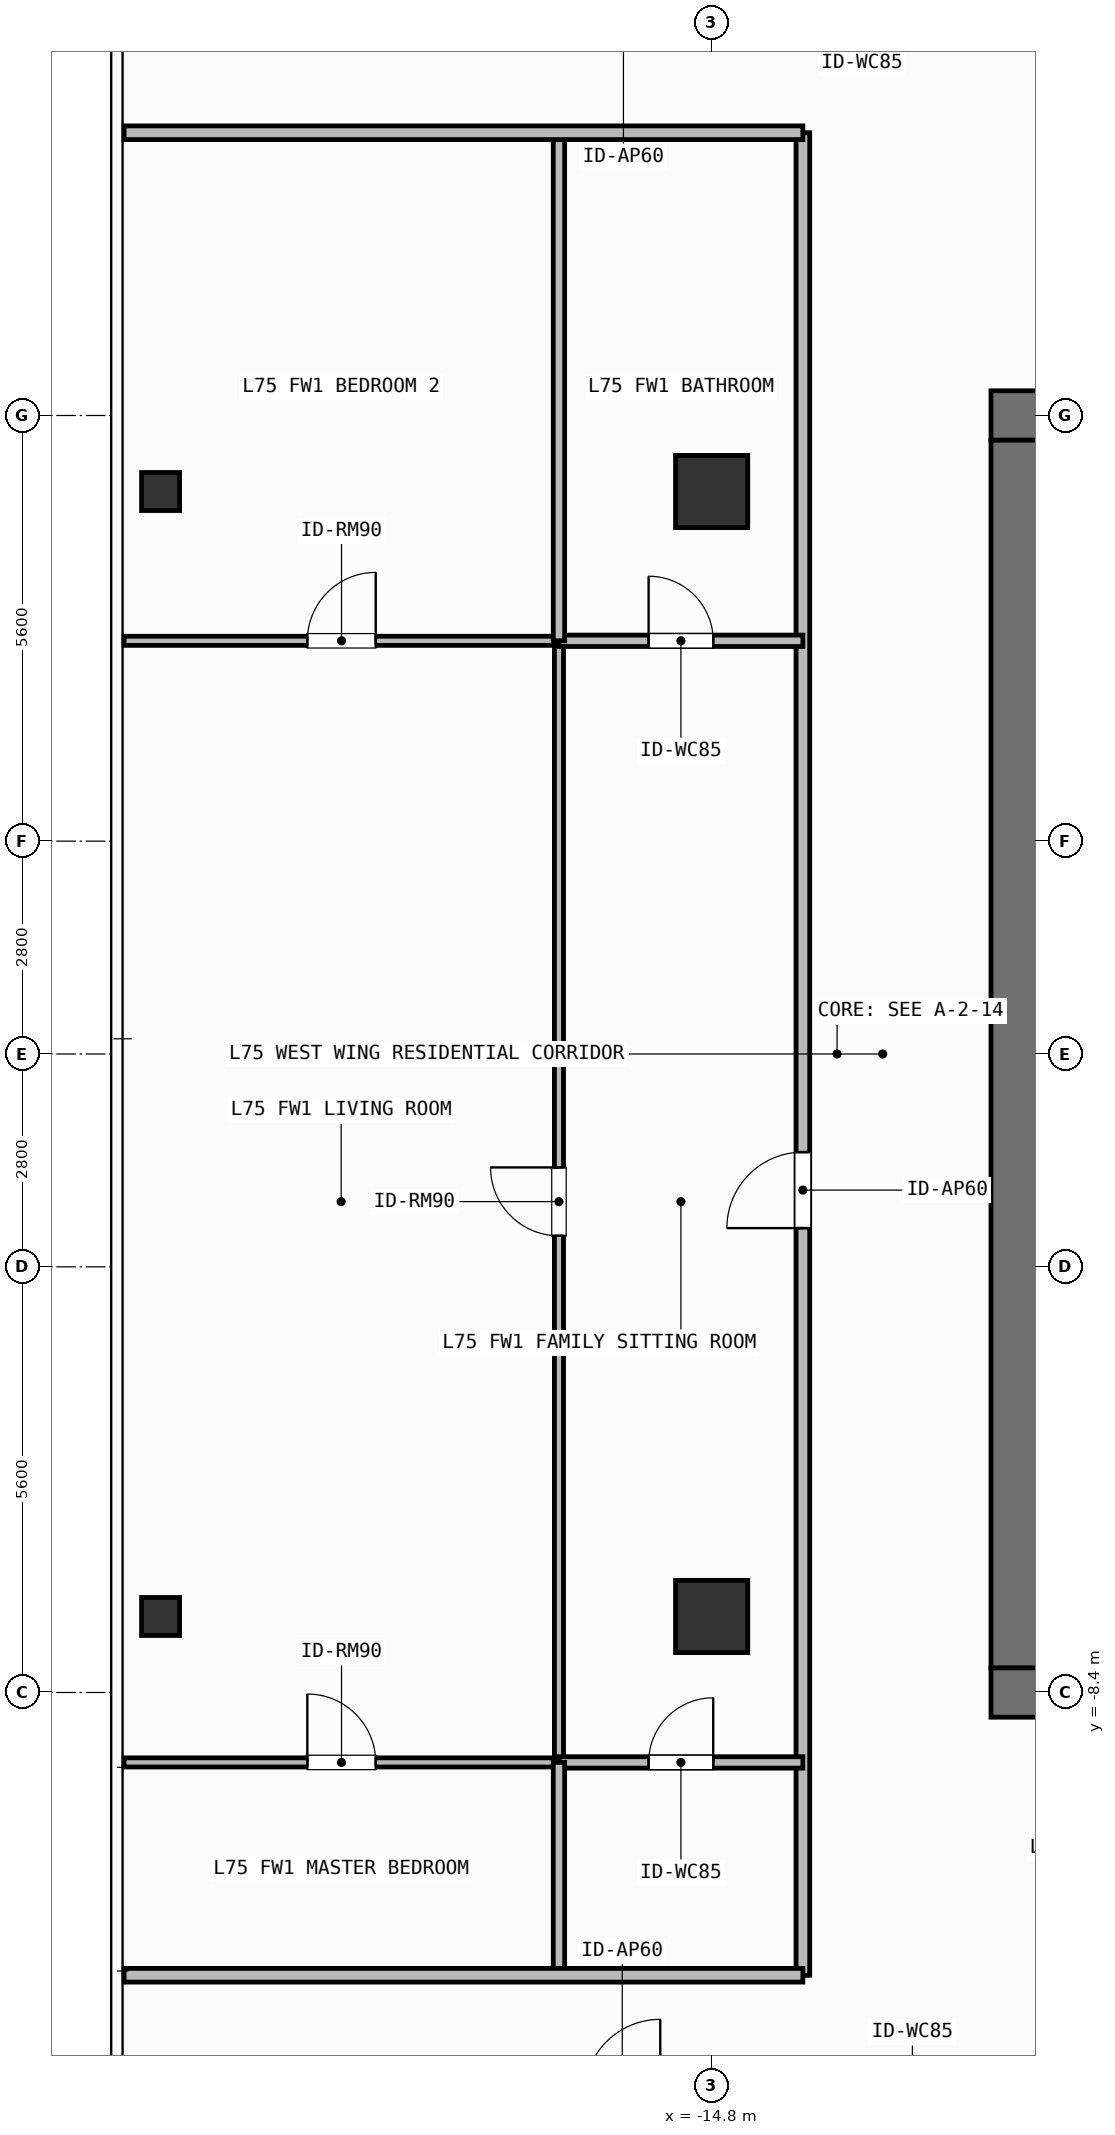
"""IFC4 building model, lengths in metres.
Left out: names, types, materials, properties, quantities, classifications, styles, units other than length and angle.
Written with IfcOpenShell. Run it as: python <this file> out.ifc"""

import sys

from ifc_helpers import new_model, si_unit, direction, frame, frame_2d, origin, origin_2d, place, context, subcontext, project, spatial, rectangle, hollow_rectangle, extrude, element, fill, save


model = new_model("IFC4")
c1 = context("Model", 3, precision=1e-05, world=origin(), true_north=direction((0.0, 1.0)))
c2 = subcontext(c1, "Body", "Model", "MODEL_VIEW")
j1 = project(units=[si_unit("LENGTHUNIT", "METRE"), si_unit("PLANEANGLEUNIT", "RADIAN")], contexts=[c1])
p1 = place(None, origin())
s1 = spatial("IfcSite", under=j1, at=p1, CompositionType="ELEMENT")
p2 = place(p1, origin())
s2 = spatial("IfcBuilding", under=s1, at=p2, CompositionType="ELEMENT")
p3 = place(p2, frame((0.0, 0.0, 305.4)))
s3 = spatial("IfcBuildingStorey", under=s2, at=p3, CompositionType="ELEMENT", Elevation=305.4)
for number, where, z_axis, x_axis in (
    (1, (-11.125, -8.4, 0.0), (0.0, 0.0, 1.0), (1.0, 0.0, 0.0)),
    (2, (-11.125, 8.4, 0.0), (0.0, 0.0, 1.0), (1.0, 0.0, 0.0)),
):
    element("IfcWall", number, at=place(p3, frame(where, z_axis=z_axis, x_axis=x_axis)), inside=s3, PredefinedType="SHEAR", context=c2, shape_type="SweptSolid", body=[
        extrude(rectangle(XDim=1.425, YDim=0.65, at=frame_2d((0.712, 0.0))), origin(), (0.0, 0.0, 1.0), 3.9),
    ])
p4 = place(p3, frame((-10.8, -8.075, 0.0), z_axis=(0.0, 0.0, 1.0), x_axis=(0.0, 1.0, 0.0)))
e3 = element("IfcWall", 3, at=p4, inside=s3, PredefinedType="SHEAR", context=c2, shape_type="SweptSolid", body=[
    extrude(rectangle(XDim=16.15, YDim=0.65, at=frame_2d((8.075, 0.0))), origin(), (0.0, 0.0, 1.0), 3.9),
])
for number, where, z_axis, x_axis in (
    (4, (-14.8, -7.4, 0.0), (0.0, 0.0, 1.0), (1.0, 0.0, 0.0)),
    (5, (-14.8, 7.4, 0.0), (0.0, 0.0, 1.0), (1.0, 0.0, 0.0)),
):
    element("IfcColumn", number, at=place(p3, frame(where, z_axis=z_axis, x_axis=x_axis)), inside=s3, PredefinedType="COLUMN", context=c2, shape_type="SweptSolid", body=[
        extrude(rectangle(XDim=0.95, YDim=0.95, at=origin_2d()), origin(), (0.0, 0.0, 1.0), 3.9),
    ])
for number, where, z_axis, x_axis in (
    (6, (-22.05, -7.4, 0.0), (0.0, 0.0, 1.0), (1.0, 0.0, 0.0)),
    (7, (-22.05, 7.4, 0.0), (0.0, 0.0, 1.0), (1.0, 0.0, 0.0)),
):
    element("IfcColumn", number, at=place(p3, frame(where, z_axis=z_axis, x_axis=x_axis)), inside=s3, PredefinedType="COLUMN", context=c2, shape_type="SweptSolid", body=[
        extrude(hollow_rectangle(XDim=0.5, YDim=0.5, WallThickness=0.025, at=origin_2d()), origin(), (0.0, 0.0, 1.0), 3.9),
    ])
p5 = place(p3, frame((-13.6, -12.12, 0.0), z_axis=(0.0, 0.0, 1.0), x_axis=(0.0, 1.0, 0.0)))
e8 = element("IfcWall", 8, at=p5, inside=s3, PredefinedType="PARTITIONING", context=c2, shape_type="SweptSolid", body=[
    extrude(rectangle(XDim=24.24, YDim=0.18, at=frame_2d((12.12, 0.0))), origin(), (0.0, 0.0, 1.0), 3.68),
])
p6 = place(p5, frame((9.829, 0.0, 0.0)))
e9 = element("IfcOpeningElement", 9, at=p6, cuts=e8, PredefinedType="OPENING", context=c2, shape_type="SweptSolid", body=[
    extrude(rectangle(XDim=1.0, YDim=2.2, at=frame_2d((0.5, 1.1))), frame((0.0, 0.1, 0.0), z_axis=(0.0, -1.0, 0.0), x_axis=(1.0, 0.0, 0.0)), (0.0, 0.0, 1.0), 0.2),
])
p7 = place(p3, frame((-16.809, -9.32, 0.0), z_axis=(0.0, 0.0, 1.0), x_axis=(0.0, 1.0, 0.0)))
e10 = element("IfcWall", 10, at=p7, inside=s3, PredefinedType="PARTITIONING", context=c2, shape_type="SweptSolid", body=[
    extrude(rectangle(XDim=14.756, YDim=0.12, at=frame_2d((7.378, 0.0))), origin(), (0.0, 0.0, 1.0), 3.68),
])
p8 = place(p7, frame((6.928, 0.0, 0.0)))
e11 = element("IfcOpeningElement", 11, at=p8, cuts=e10, PredefinedType="OPENING", context=c2, shape_type="SweptSolid", body=[
    extrude(rectangle(XDim=0.9, YDim=2.1, at=frame_2d((0.45, 1.05))), frame((0.0, 0.07, 0.0), z_axis=(0.0, -1.0, 0.0), x_axis=(1.0, 0.0, 0.0)), (0.0, 0.0, 1.0), 0.14),
])
p9 = place(p3, frame((-16.809, 5.436, 0.0), z_axis=(0.0, 0.0, 1.0), x_axis=(1.0, 0.0, 0.0)))
e12 = element("IfcWall", 12, at=p9, inside=s3, PredefinedType="PARTITIONING", context=c2, shape_type="SweptSolid", body=[
    extrude(rectangle(XDim=3.209, YDim=0.15, at=frame_2d((1.604, 0.0))), origin(), (0.0, 0.0, 1.0), 3.68),
])
p10 = place(p9, frame((1.179, 0.0, 0.0)))
e13 = element("IfcOpeningElement", 13, at=p10, cuts=e12, PredefinedType="OPENING", context=c2, shape_type="SweptSolid", body=[
    extrude(rectangle(XDim=0.85, YDim=2.1, at=frame_2d((0.425, 1.05))), frame((0.0, 0.085, 0.0), z_axis=(0.0, -1.0, 0.0), x_axis=(1.0, 0.0, 0.0)), (0.0, 0.0, 1.0), 0.17),
])
p11 = place(p3, frame((-16.809, -9.32, 0.0), z_axis=(0.0, 0.0, 1.0), x_axis=(1.0, 0.0, 0.0)))
e14 = element("IfcWall", 14, at=p11, inside=s3, PredefinedType="PARTITIONING", context=c2, shape_type="SweptSolid", body=[
    extrude(rectangle(XDim=3.209, YDim=0.15, at=frame_2d((1.604, 0.0))), origin(), (0.0, 0.0, 1.0), 3.68),
])
p12 = place(p11, frame((1.179, 0.0, 0.0)))
e15 = element("IfcOpeningElement", 15, at=p12, cuts=e14, PredefinedType="OPENING", context=c2, shape_type="SweptSolid", body=[
    extrude(rectangle(XDim=0.85, YDim=2.1, at=frame_2d((0.425, 1.05))), frame((0.0, 0.085, 0.0), z_axis=(0.0, -1.0, 0.0), x_axis=(1.0, 0.0, 0.0)), (0.0, 0.0, 1.0), 0.17),
])
p13 = place(p3, frame((-22.53, -9.32, 0.0), z_axis=(0.0, 0.0, 1.0), x_axis=(1.0, 0.0, 0.0)))
e16 = element("IfcWall", 16, at=p13, inside=s3, PredefinedType="PARTITIONING", context=c2, shape_type="SweptSolid", body=[
    extrude(rectangle(XDim=5.721, YDim=0.12, at=frame_2d((2.86, 0.0))), origin(), (0.0, 0.0, 1.0), 3.68),
])
p14 = place(p13, frame((2.41, 0.0, 0.0)))
e17 = element("IfcOpeningElement", 17, at=p14, cuts=e16, PredefinedType="OPENING", context=c2, shape_type="SweptSolid", body=[
    extrude(rectangle(XDim=0.9, YDim=2.1, at=frame_2d((0.45, 1.05))), frame((0.0, 0.07, 0.0), z_axis=(0.0, -1.0, 0.0), x_axis=(1.0, 0.0, 0.0)), (0.0, 0.0, 1.0), 0.14),
])
p15 = place(p3, frame((-22.53, 5.436, 0.0), z_axis=(0.0, 0.0, 1.0), x_axis=(1.0, 0.0, 0.0)))
e18 = element("IfcWall", 18, at=p15, inside=s3, PredefinedType="PARTITIONING", context=c2, shape_type="SweptSolid", body=[
    extrude(rectangle(XDim=5.721, YDim=0.12, at=frame_2d((2.86, 0.0))), origin(), (0.0, 0.0, 1.0), 3.68),
])
p16 = place(p15, frame((2.41, 0.0, 0.0)))
e19 = element("IfcOpeningElement", 19, at=p16, cuts=e18, PredefinedType="OPENING", context=c2, shape_type="SweptSolid", body=[
    extrude(rectangle(XDim=0.9, YDim=2.1, at=frame_2d((0.45, 1.05))), frame((0.0, 0.07, 0.0), z_axis=(0.0, -1.0, 0.0), x_axis=(1.0, 0.0, 0.0)), (0.0, 0.0, 1.0), 0.14),
])
p17 = place(p3, frame((-16.809, -12.12, 0.0), z_axis=(0.0, 0.0, 1.0), x_axis=(0.0, 1.0, 0.0)))
e20 = element("IfcWall", 20, at=p17, inside=s3, PredefinedType="PARTITIONING", context=c2, shape_type="SweptSolid", body=[
    extrude(rectangle(XDim=2.8, YDim=0.15, at=frame_2d((1.4, 0.0))), origin(), (0.0, 0.0, 1.0), 3.68),
])
p18 = place(p3, frame((-16.809, 5.436, 0.0), z_axis=(0.0, 0.0, 1.0), x_axis=(0.0, 1.0, 0.0)))
e21 = element("IfcWall", 21, at=p18, inside=s3, PredefinedType="PARTITIONING", context=c2, shape_type="SweptSolid", body=[
    extrude(rectangle(XDim=6.684, YDim=0.15, at=frame_2d((3.342, 0.0))), origin(), (0.0, 0.0, 1.0), 3.68),
])
for number, where, z_axis, x_axis in (
    (22, (-22.53, -12.12, 0.0), (0.0, 0.0, 1.0), (1.0, 0.0, 0.0)),
    (23, (-22.53, 12.12, 0.0), (0.0, 0.0, 1.0), (1.0, 0.0, 0.0)),
):
    element("IfcWall", number, at=place(p3, frame(where, z_axis=z_axis, x_axis=x_axis)), inside=s3, PredefinedType="PARTITIONING", context=c2, shape_type="SweptSolid", body=[
        extrude(rectangle(XDim=8.93, YDim=0.18, at=frame_2d((4.465, 0.0))), origin(), (0.0, 0.0, 1.0), 3.68),
    ])
p19 = place(p6, origin())
e24 = element("IfcDoor", 24, at=p19, inside=s3, OperationType="SINGLE_SWING_LEFT", PredefinedType="DOOR", context=c2, shape_type="SweptSolid", body=[
    extrude(rectangle(XDim=1.0, YDim=2.2, at=frame_2d((0.5, 1.1))), frame((0.0, 0.025, 0.0), z_axis=(0.0, -1.0, 0.0), x_axis=(1.0, 0.0, 0.0)), (0.0, 0.0, 1.0), 0.05),
])
fill(e9, e24)
p20 = place(p8, origin())
e25 = element("IfcDoor", 25, at=p20, inside=s3, OperationType="SINGLE_SWING_RIGHT", PredefinedType="DOOR", context=c2, shape_type="SweptSolid", body=[
    extrude(rectangle(XDim=0.9, YDim=2.1, at=frame_2d((0.45, 1.05))), frame((0.0, 0.025, 0.0), z_axis=(0.0, -1.0, 0.0), x_axis=(1.0, 0.0, 0.0)), (0.0, 0.0, 1.0), 0.05),
])
fill(e11, e25)
p21 = place(p10, origin())
e26 = element("IfcDoor", 26, at=p21, inside=s3, OperationType="SINGLE_SWING_LEFT", PredefinedType="DOOR", context=c2, shape_type="SweptSolid", body=[
    extrude(rectangle(XDim=0.85, YDim=2.1, at=frame_2d((0.425, 1.05))), frame((0.0, 0.025, 0.0), z_axis=(0.0, -1.0, 0.0), x_axis=(1.0, 0.0, 0.0)), (0.0, 0.0, 1.0), 0.05),
])
fill(e13, e26)
p22 = place(p12, origin())
e27 = element("IfcDoor", 27, at=p22, inside=s3, OperationType="SINGLE_SWING_RIGHT", PredefinedType="DOOR", context=c2, shape_type="SweptSolid", body=[
    extrude(rectangle(XDim=0.85, YDim=2.1, at=frame_2d((0.425, 1.05))), frame((0.0, 0.025, 0.0), z_axis=(0.0, -1.0, 0.0), x_axis=(1.0, 0.0, 0.0)), (0.0, 0.0, 1.0), 0.05),
])
fill(e15, e27)
p23 = place(p14, origin())
e28 = element("IfcDoor", 28, at=p23, inside=s3, OperationType="SINGLE_SWING_LEFT", PredefinedType="DOOR", context=c2, shape_type="SweptSolid", body=[
    extrude(rectangle(XDim=0.9, YDim=2.1, at=frame_2d((0.45, 1.05))), frame((0.0, 0.025, 0.0), z_axis=(0.0, -1.0, 0.0), x_axis=(1.0, 0.0, 0.0)), (0.0, 0.0, 1.0), 0.05),
])
fill(e17, e28)
p24 = place(p16, origin())
e29 = element("IfcDoor", 29, at=p24, inside=s3, OperationType="SINGLE_SWING_RIGHT", PredefinedType="DOOR", context=c2, shape_type="SweptSolid", body=[
    extrude(rectangle(XDim=0.9, YDim=2.1, at=frame_2d((0.45, 1.05))), frame((0.0, 0.025, 0.0), z_axis=(0.0, -1.0, 0.0), x_axis=(1.0, 0.0, 0.0)), (0.0, 0.0, 1.0), 0.05),
])
fill(e19, e29)
save(model, sys.argv[1])
